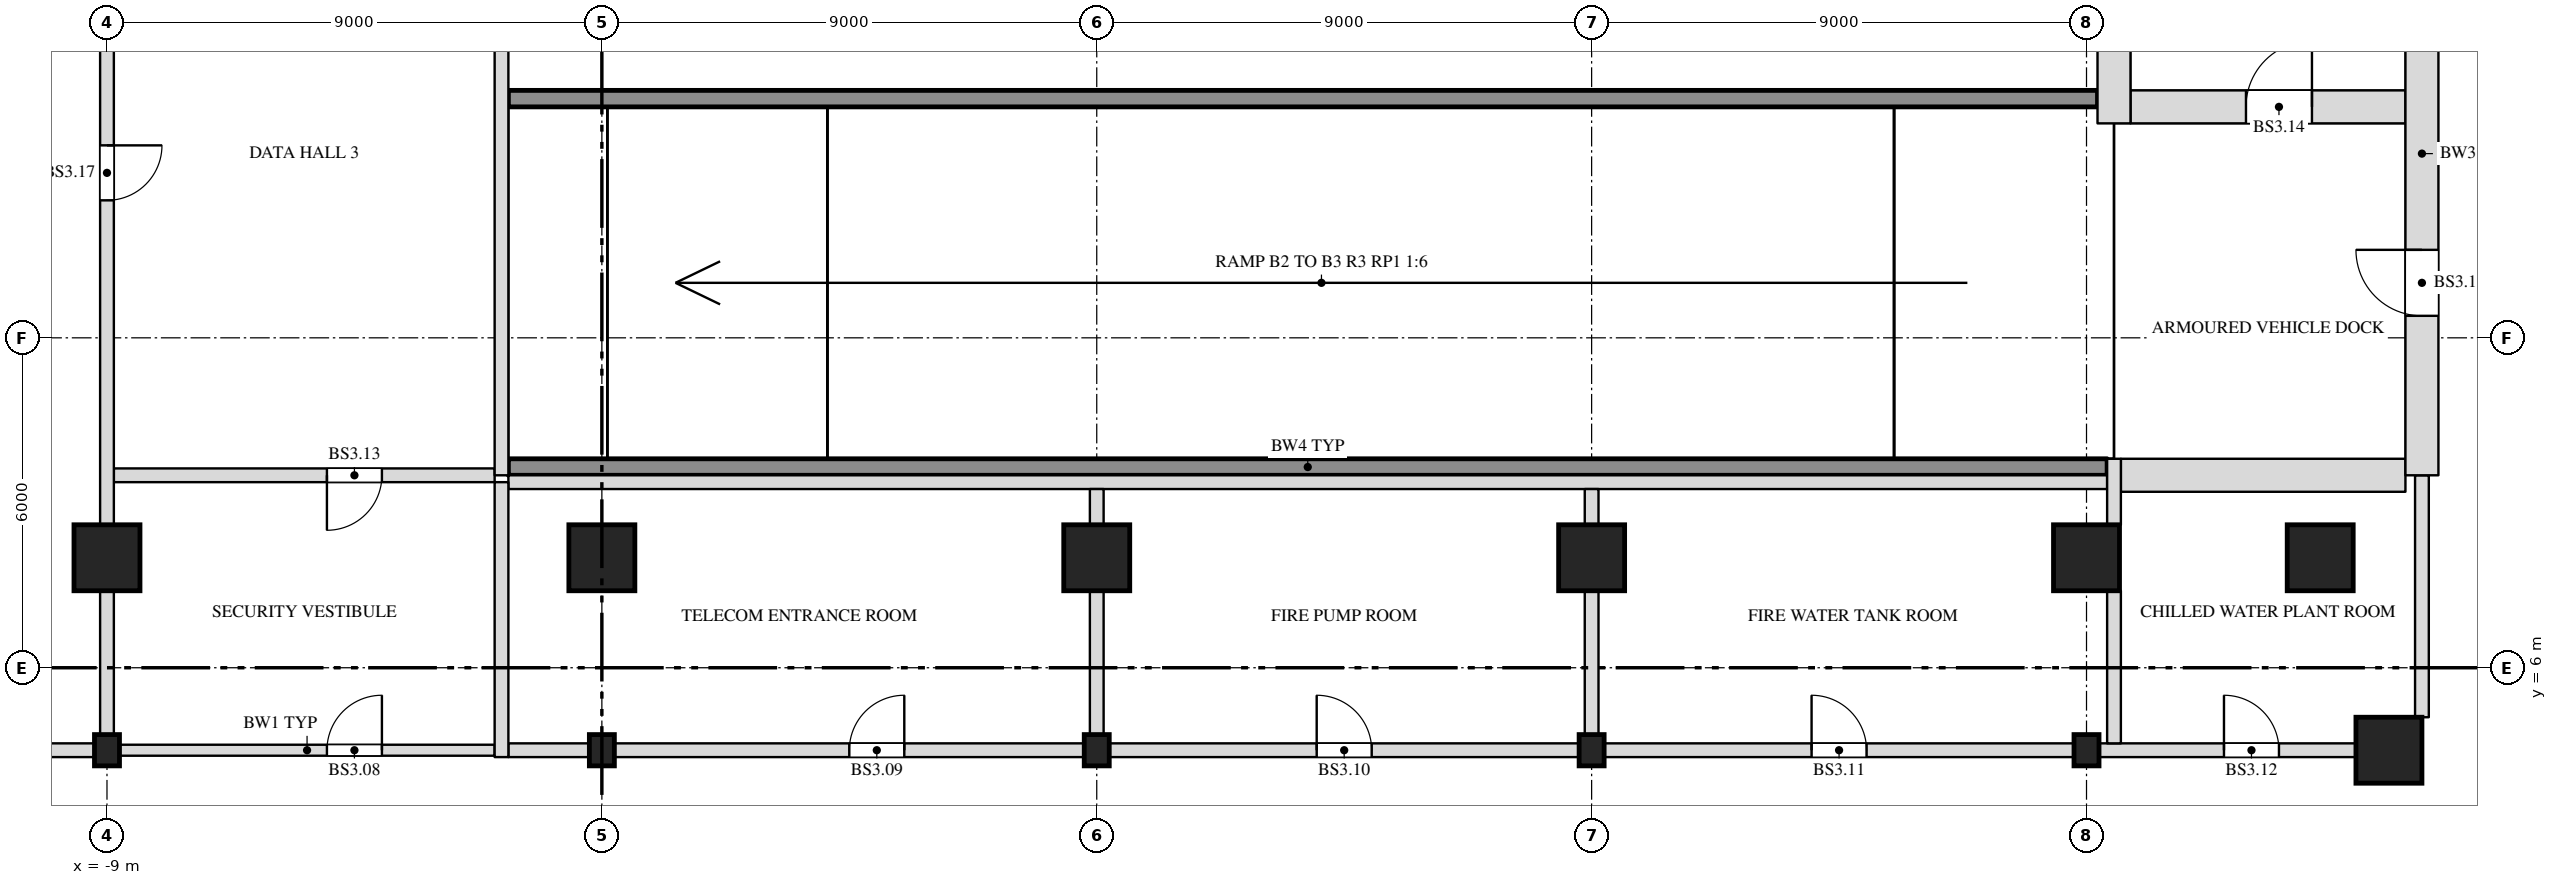
"""IFC4 building model, lengths in metres.
Left out: names, types, materials, properties, quantities, classifications, styles, units other than length and angle.
Written with IfcOpenShell. Run it as: python <this file> out.ifc"""

import sys

from ifc_helpers import new_model, si_unit, direction, frame, frame_2d, origin, origin_2d, place, context, subcontext, project, spatial, rectangle, i_section, extrude, element, fill, save


model = new_model("IFC4")
c1 = context("Model", 3, precision=1e-05, world=origin(), true_north=direction((0.0, 1.0)))
c2 = subcontext(c1, "Body", "Model", "MODEL_VIEW")
j1 = project(units=[si_unit("LENGTHUNIT", "METRE"), si_unit("PLANEANGLEUNIT", "RADIAN")], contexts=[c1])
p1 = place(None, origin())
s1 = spatial("IfcSite", under=j1, at=p1, CompositionType="ELEMENT")
p2 = place(p1, origin())
s2 = spatial("IfcBuilding", under=s1, at=p2, CompositionType="ELEMENT")
p3 = place(p2, frame((0.0, 0.0, -12.6)))
s3 = spatial("IfcBuildingStorey", under=s2, at=p3, CompositionType="ELEMENT", Elevation=-12.6)
for number, where, z_axis, x_axis in (
    (1, (-9.0, 4.5, 0.0), (0.0, 0.0, 1.0), (1.0, 0.0, 0.0)),
    (2, (0.0, 4.5, 0.0), (0.0, 0.0, 1.0), (1.0, 0.0, 0.0)),
    (3, (9.0, 4.5, 0.0), (0.0, 0.0, 1.0), (1.0, 0.0, 0.0)),
    (4, (18.0, 4.5, 0.0), (0.0, 0.0, 1.0), (1.0, 0.0, 0.0)),
    (5, (27.0, 4.5, 0.0), (0.0, 0.0, 1.0), (1.0, 0.0, 0.0)),
):
    element("IfcColumn", number, at=place(p3, frame(where, z_axis=z_axis, x_axis=x_axis)), inside=s3, PredefinedType="COLUMN", context=c2, shape_type="SweptSolid", body=[
        extrude(i_section(OverallWidth=0.455, OverallDepth=0.569, WebThickness=0.078, FlangeThickness=0.125, at=origin_2d()), origin(), (0.0, 0.0, 1.0), 4.2),
    ])
for number, where, z_axis, x_axis in (
    (6, (32.5, 4.5, 0.0), (0.0, 0.0, 1.0), (1.0, 0.0, 0.0)),
    (7, (-9.0, 8.0, 0.0), (0.0, 0.0, 1.0), (1.0, 0.0, 0.0)),
    (8, (0.0, 8.0, 0.0), (0.0, 0.0, 1.0), (1.0, 0.0, 0.0)),
    (9, (9.0, 8.0, 0.0), (0.0, 0.0, 1.0), (1.0, 0.0, 0.0)),
    (10, (18.0, 8.0, 0.0), (0.0, 0.0, 1.0), (1.0, 0.0, 0.0)),
    (11, (27.0, 8.0, 0.0), (0.0, 0.0, 1.0), (1.0, 0.0, 0.0)),
    (12, (31.25, 8.0, 0.0), (0.0, 0.0, 1.0), (1.0, 0.0, 0.0)),
):
    element("IfcColumn", number, at=place(p3, frame(where, z_axis=z_axis, x_axis=x_axis)), inside=s3, PredefinedType="COLUMN", context=c2, shape_type="SweptSolid", body=[
        extrude(rectangle(XDim=1.2, YDim=1.2, at=origin_2d()), origin(), (0.0, 0.0, 1.0), 4.2),
    ])
p4 = place(p3, frame((-17.773, 4.5, 0.0), z_axis=(0.0, 0.0, 1.0), x_axis=(1.0, 0.0, 0.0)))
e13 = element("IfcWall", 13, at=p4, inside=s3, PredefinedType="SOLIDWALL", context=c2, shape_type="SweptSolid", body=[
    extrude(rectangle(XDim=8.545, YDim=0.25, at=frame_2d((4.273, 0.0))), origin(), (0.0, 0.0, 1.0), 3.9),
])
p5 = place(p3, frame((-8.773, 4.5, 0.0), z_axis=(0.0, 0.0, 1.0), x_axis=(1.0, 0.0, 0.0)))
e14 = element("IfcWall", 14, at=p5, inside=s3, PredefinedType="PARTITIONING", context=c2, shape_type="SweptSolid", body=[
    extrude(rectangle(XDim=6.823, YDim=0.2, at=frame_2d((3.411, 0.0))), origin(), (0.0, 0.0, 1.0), 3.9),
])
p6 = place(p5, frame((3.773, 0.0, 0.0)))
e15 = element("IfcOpeningElement", 15, at=p6, cuts=e14, PredefinedType="OPENING", context=c2, shape_type="SweptSolid", body=[
    extrude(rectangle(XDim=1.0, YDim=2.1, at=frame_2d((0.5, 1.05))), frame((0.0, 0.112, 0.0), z_axis=(0.0, -1.0, 0.0), x_axis=(1.0, 0.0, 0.0)), (0.0, 0.0, 1.0), 0.224),
])
p7 = place(p3, frame((-1.7, 4.5, 0.0), z_axis=(0.0, 0.0, 1.0), x_axis=(1.0, 0.0, 0.0)))
e16 = element("IfcWall", 16, at=p7, inside=s3, PredefinedType="SOLIDWALL", context=c2, shape_type="SweptSolid", body=[
    extrude(rectangle(XDim=1.473, YDim=0.25, at=frame_2d((0.736, 0.0))), origin(), (0.0, 0.0, 1.0), 3.9),
])
p8 = place(p3, frame((0.227, 4.5, 0.0), z_axis=(0.0, 0.0, 1.0), x_axis=(1.0, 0.0, 0.0)))
e17 = element("IfcWall", 17, at=p8, inside=s3, PredefinedType="SOLIDWALL", context=c2, shape_type="SweptSolid", body=[
    extrude(rectangle(XDim=8.545, YDim=0.25, at=frame_2d((4.273, 0.0))), origin(), (0.0, 0.0, 1.0), 3.9),
])
p9 = place(p8, frame((4.273, 0.0, 0.0)))
e18 = element("IfcOpeningElement", 18, at=p9, cuts=e17, PredefinedType="OPENING", context=c2, shape_type="SweptSolid", body=[
    extrude(rectangle(XDim=1.0, YDim=2.1, at=frame_2d((0.5, 1.05))), frame((0.0, 0.137, 0.0), z_axis=(0.0, -1.0, 0.0), x_axis=(1.0, 0.0, 0.0)), (0.0, 0.0, 1.0), 0.274),
])
p10 = place(p3, frame((9.227, 4.5, 0.0), z_axis=(0.0, 0.0, 1.0), x_axis=(1.0, 0.0, 0.0)))
e19 = element("IfcWall", 19, at=p10, inside=s3, PredefinedType="SOLIDWALL", context=c2, shape_type="SweptSolid", body=[
    extrude(rectangle(XDim=8.545, YDim=0.25, at=frame_2d((4.273, 0.0))), origin(), (0.0, 0.0, 1.0), 3.9),
])
p11 = place(p10, frame((3.773, 0.0, 0.0)))
e20 = element("IfcOpeningElement", 20, at=p11, cuts=e19, PredefinedType="OPENING", context=c2, shape_type="SweptSolid", body=[
    extrude(rectangle(XDim=1.0, YDim=2.1, at=frame_2d((0.5, 1.05))), frame((0.0, 0.137, 0.0), z_axis=(0.0, -1.0, 0.0), x_axis=(1.0, 0.0, 0.0)), (0.0, 0.0, 1.0), 0.274),
])
p12 = place(p3, frame((18.227, 4.5, 0.0), z_axis=(0.0, 0.0, 1.0), x_axis=(1.0, 0.0, 0.0)))
e21 = element("IfcWall", 21, at=p12, inside=s3, PredefinedType="SOLIDWALL", context=c2, shape_type="SweptSolid", body=[
    extrude(rectangle(XDim=8.545, YDim=0.25, at=frame_2d((4.273, 0.0))), origin(), (0.0, 0.0, 1.0), 3.9),
])
p13 = place(p12, frame((3.773, 0.0, 0.0)))
e22 = element("IfcOpeningElement", 22, at=p13, cuts=e21, PredefinedType="OPENING", context=c2, shape_type="SweptSolid", body=[
    extrude(rectangle(XDim=1.0, YDim=2.1, at=frame_2d((0.5, 1.05))), frame((0.0, 0.137, 0.0), z_axis=(0.0, -1.0, 0.0), x_axis=(1.0, 0.0, 0.0)), (0.0, 0.0, 1.0), 0.274),
])
p14 = place(p3, frame((27.227, 4.5, 0.0), z_axis=(0.0, 0.0, 1.0), x_axis=(1.0, 0.0, 0.0)))
e23 = element("IfcWall", 23, at=p14, inside=s3, PredefinedType="SOLIDWALL", context=c2, shape_type="SweptSolid", body=[
    extrude(rectangle(XDim=4.673, YDim=0.25, at=frame_2d((2.336, 0.0))), origin(), (0.0, 0.0, 1.0), 3.9),
])
p15 = place(p14, frame((2.273, 0.0, 0.0)))
e24 = element("IfcOpeningElement", 24, at=p15, cuts=e23, PredefinedType="OPENING", context=c2, shape_type="SweptSolid", body=[
    extrude(rectangle(XDim=1.0, YDim=2.1, at=frame_2d((0.5, 1.05))), frame((0.0, 0.137, 0.0), z_axis=(0.0, -1.0, 0.0), x_axis=(1.0, 0.0, 0.0)), (0.0, 0.0, 1.0), 0.274),
])
p16 = place(p3, frame((-1.7, 9.375, 0.0), z_axis=(0.0, 0.0, 1.0), x_axis=(1.0, 0.0, 0.0)))
e25 = element("IfcWall", 25, at=p16, inside=s3, PredefinedType="SOLIDWALL", context=c2, shape_type="SweptSolid", body=[
    extrude(rectangle(XDim=29.075, YDim=0.25, at=frame_2d((14.538, 0.0))), origin(), (0.0, 0.0, 1.0), 3.9),
])
p17 = place(p3, frame((-8.875, 9.5, 0.0), z_axis=(0.0, 0.0, 1.0), x_axis=(1.0, 0.0, 0.0)))
e26 = element("IfcWall", 26, at=p17, inside=s3, PredefinedType="SOLIDWALL", context=c2, shape_type="SweptSolid", body=[
    extrude(rectangle(XDim=6.925, YDim=0.25, at=frame_2d((3.462, 0.0))), origin(), (0.0, 0.0, 1.0), 3.9),
])
p18 = place(p17, frame((3.875, 0.0, 0.0)))
e27 = element("IfcOpeningElement", 27, at=p18, cuts=e26, PredefinedType="OPENING", context=c2, shape_type="SweptSolid", body=[
    extrude(rectangle(XDim=1.0, YDim=2.1, at=frame_2d((0.5, 1.05))), frame((0.0, 0.137, 0.0), z_axis=(0.0, -1.0, 0.0), x_axis=(1.0, 0.0, 0.0)), (0.0, 0.0, 1.0), 0.274),
])
p19 = place(p3, frame((27.625, 9.5, 0.0), z_axis=(0.0, 0.0, 1.0), x_axis=(1.0, 0.0, 0.0)))
e28 = element("IfcWall", 28, at=p19, inside=s3, PredefinedType="SOLIDWALL", context=c2, shape_type="SweptSolid", body=[
    extrude(rectangle(XDim=5.175, YDim=0.6, at=frame_2d((2.587, 0.0))), origin(), (0.0, 0.0, 1.0), 3.9),
])
p20 = place(p3, frame((27.8, 16.2, 0.0), z_axis=(0.0, 0.0, 1.0), x_axis=(1.0, 0.0, 0.0)))
e29 = element("IfcWall", 29, at=p20, inside=s3, PredefinedType="SOLIDWALL", context=c2, shape_type="SweptSolid", body=[
    extrude(rectangle(XDim=5.0, YDim=0.6, at=frame_2d((2.5, 0.0))), origin(), (0.0, 0.0, 1.0), 3.9),
])
p21 = place(p20, frame((2.1, 0.0, 0.0)))
e30 = element("IfcOpeningElement", 30, at=p21, cuts=e29, PredefinedType="OPENING", context=c2, shape_type="SweptSolid", body=[
    extrude(rectangle(XDim=1.2, YDim=2.4, at=frame_2d((0.6, 1.2))), frame((0.0, 0.312, 0.0), z_axis=(0.0, -1.0, 0.0), x_axis=(1.0, 0.0, 0.0)), (0.0, 0.0, 1.0), 0.624),
])
p22 = place(p3, frame((-9.0, 4.784, 0.0), z_axis=(0.0, 0.0, 1.0), x_axis=(0.0, 1.0, 0.0)))
e31 = element("IfcWall", 31, at=p22, inside=s3, PredefinedType="SOLIDWALL", context=c2, shape_type="SweptSolid", body=[
    extrude(rectangle(XDim=2.615, YDim=0.25, at=frame_2d((1.308, 0.0))), origin(), (0.0, 0.0, 1.0), 3.9),
])
p23 = place(p3, frame((-9.0, 8.6, 0.0), z_axis=(0.0, 0.0, 1.0), x_axis=(0.0, 1.0, 0.0)))
e32 = element("IfcWall", 32, at=p23, inside=s3, PredefinedType="SOLIDWALL", context=c2, shape_type="SweptSolid", body=[
    extrude(rectangle(XDim=12.6, YDim=0.25, at=frame_2d((6.3, 0.0))), origin(), (0.0, 0.0, 1.0), 3.9),
])
p24 = place(p23, frame((5.9, 0.0, 0.0)))
e33 = element("IfcOpeningElement", 33, at=p24, cuts=e32, PredefinedType="OPENING", context=c2, shape_type="SweptSolid", body=[
    extrude(rectangle(XDim=1.0, YDim=2.1, at=frame_2d((0.5, 1.05))), frame((0.0, 0.137, 0.0), z_axis=(0.0, -1.0, 0.0), x_axis=(1.0, 0.0, 0.0)), (0.0, 0.0, 1.0), 0.274),
])
p25 = place(p3, frame((-1.825, 4.375, 0.0), z_axis=(0.0, 0.0, 1.0), x_axis=(0.0, 1.0, 0.0)))
e34 = element("IfcWall", 34, at=p25, inside=s3, PredefinedType="SOLIDWALL", context=c2, shape_type="SweptSolid", body=[
    extrude(rectangle(XDim=5.0, YDim=0.25, at=frame_2d((2.5, 0.0))), origin(), (0.0, 0.0, 1.0), 3.9),
])
p26 = place(p3, frame((-1.825, 9.5, 0.0), z_axis=(0.0, 0.0, 1.0), x_axis=(0.0, 1.0, 0.0)))
e35 = element("IfcWall", 35, at=p26, inside=s3, PredefinedType="SOLIDWALL", context=c2, shape_type="SweptSolid", body=[
    extrude(rectangle(XDim=11.7, YDim=0.25, at=frame_2d((5.85, 0.0))), origin(), (0.0, 0.0, 1.0), 3.9),
])
p27 = place(p3, frame((9.0, 4.784, 0.0), z_axis=(0.0, 0.0, 1.0), x_axis=(0.0, 1.0, 0.0)))
e36 = element("IfcWall", 36, at=p27, inside=s3, PredefinedType="SOLIDWALL", context=c2, shape_type="SweptSolid", body=[
    extrude(rectangle(XDim=2.615, YDim=0.25, at=frame_2d((1.308, 0.0))), origin(), (0.0, 0.0, 1.0), 3.9),
])
p28 = place(p3, frame((9.0, 8.6, 0.0), z_axis=(0.0, 0.0, 1.0), x_axis=(0.0, 1.0, 0.0)))
e37 = element("IfcWall", 37, at=p28, inside=s3, PredefinedType="SOLIDWALL", context=c2, shape_type="SweptSolid", body=[
    extrude(rectangle(XDim=0.65, YDim=0.25, at=frame_2d((0.325, 0.0))), origin(), (0.0, 0.0, 1.0), 3.9),
])
p29 = place(p3, frame((18.0, 4.784, 0.0), z_axis=(0.0, 0.0, 1.0), x_axis=(0.0, 1.0, 0.0)))
e38 = element("IfcWall", 38, at=p29, inside=s3, PredefinedType="SOLIDWALL", context=c2, shape_type="SweptSolid", body=[
    extrude(rectangle(XDim=2.615, YDim=0.25, at=frame_2d((1.308, 0.0))), origin(), (0.0, 0.0, 1.0), 3.9),
])
p30 = place(p3, frame((18.0, 8.6, 0.0), z_axis=(0.0, 0.0, 1.0), x_axis=(0.0, 1.0, 0.0)))
e39 = element("IfcWall", 39, at=p30, inside=s3, PredefinedType="SOLIDWALL", context=c2, shape_type="SweptSolid", body=[
    extrude(rectangle(XDim=0.65, YDim=0.25, at=frame_2d((0.325, 0.0))), origin(), (0.0, 0.0, 1.0), 3.9),
])
p31 = place(p3, frame((27.5, 4.625, 0.0), z_axis=(0.0, 0.0, 1.0), x_axis=(0.0, 1.0, 0.0)))
e40 = element("IfcWall", 40, at=p31, inside=s3, PredefinedType="SOLIDWALL", context=c2, shape_type="SweptSolid", body=[
    extrude(rectangle(XDim=2.775, YDim=0.25, at=frame_2d((1.387, 0.0))), origin(), (0.0, 0.0, 1.0), 3.9),
])
p32 = place(p3, frame((27.5, 8.6, 0.0), z_axis=(0.0, 0.0, 1.0), x_axis=(0.0, 1.0, 0.0)))
e41 = element("IfcWall", 41, at=p32, inside=s3, PredefinedType="SOLIDWALL", context=c2, shape_type="SweptSolid", body=[
    extrude(rectangle(XDim=1.2, YDim=0.25, at=frame_2d((0.6, 0.0))), origin(), (0.0, 0.0, 1.0), 3.9),
])
p33 = place(p3, frame((27.5, 15.9, 0.0), z_axis=(0.0, 0.0, 1.0), x_axis=(0.0, 1.0, 0.0)))
e42 = element("IfcWall", 42, at=p33, inside=s3, PredefinedType="SOLIDWALL", context=c2, shape_type="SweptSolid", body=[
    extrude(rectangle(XDim=1.5, YDim=0.6, at=frame_2d((0.75, 0.0))), origin(), (0.0, 0.0, 1.0), 3.9),
])
p34 = place(p3, frame((33.1, 5.1, 0.0), z_axis=(0.0, 0.0, 1.0), x_axis=(0.0, 1.0, 0.0)))
e43 = element("IfcWall", 43, at=p34, inside=s3, PredefinedType="SOLIDWALL", context=c2, shape_type="SweptSolid", body=[
    extrude(rectangle(XDim=4.4, YDim=0.25, at=frame_2d((2.2, 0.0))), origin(), (0.0, 0.0, 1.0), 3.9),
])
p35 = place(p3, frame((33.1, 9.5, 0.0), z_axis=(0.0, 0.0, 1.0), x_axis=(0.0, 1.0, 0.0)))
e44 = element("IfcWall", 44, at=p35, inside=s3, PredefinedType="SOLIDWALL", context=c2, shape_type="SweptSolid", body=[
    extrude(rectangle(XDim=11.7, YDim=0.6, at=frame_2d((5.85, 0.0))), origin(), (0.0, 0.0, 1.0), 3.9),
])
p36 = place(p35, frame((2.9, 0.0, 0.0)))
e45 = element("IfcOpeningElement", 45, at=p36, cuts=e44, PredefinedType="OPENING", context=c2, shape_type="SweptSolid", body=[
    extrude(rectangle(XDim=1.2, YDim=2.4, at=frame_2d((0.6, 1.2))), frame((0.0, 0.312, 0.0), z_axis=(0.0, -1.0, 0.0), x_axis=(1.0, 0.0, 0.0)), (0.0, 0.0, 1.0), 0.624),
])
p37 = place(p3, frame((-1.7, 9.65, 0.0), z_axis=(0.0, 0.0, 1.0), x_axis=(1.0, 0.0, 0.0)))
e46 = element("IfcWall", 46, at=p37, inside=s3, PredefinedType="SOLIDWALL", context=c2, shape_type="SweptSolid", body=[
    extrude(rectangle(XDim=29.075, YDim=0.3, at=frame_2d((14.538, 0.0))), origin(), (0.0, 0.0, 1.0), 4.2),
])
p38 = place(p3, frame((-1.7, 16.35, 0.0), z_axis=(0.0, 0.0, 1.0), x_axis=(1.0, 0.0, 0.0)))
e47 = element("IfcWall", 47, at=p38, inside=s3, PredefinedType="SOLIDWALL", context=c2, shape_type="SweptSolid", body=[
    extrude(rectangle(XDim=28.9, YDim=0.3, at=frame_2d((14.45, 0.0))), origin(), (0.0, 0.0, 1.0), 4.2),
])
p39 = place(p6, origin())
e48 = element("IfcDoor", 48, at=p39, inside=s3, OperationType="SINGLE_SWING_RIGHT", PredefinedType="DOOR", context=c2, shape_type="SweptSolid", body=[
    extrude(rectangle(XDim=1.0, YDim=2.1, at=frame_2d((0.5, 1.05))), frame((0.0, 0.025, 0.0), z_axis=(0.0, -1.0, 0.0), x_axis=(1.0, 0.0, 0.0)), (0.0, 0.0, 1.0), 0.05),
])
fill(e15, e48)
p40 = place(p9, origin())
e49 = element("IfcDoor", 49, at=p40, inside=s3, OperationType="SINGLE_SWING_RIGHT", PredefinedType="DOOR", context=c2, shape_type="SweptSolid", body=[
    extrude(rectangle(XDim=1.0, YDim=2.1, at=frame_2d((0.5, 1.05))), frame((0.0, 0.025, 0.0), z_axis=(0.0, -1.0, 0.0), x_axis=(1.0, 0.0, 0.0)), (0.0, 0.0, 1.0), 0.05),
])
fill(e18, e49)
p41 = place(p11, origin())
e50 = element("IfcDoor", 50, at=p41, inside=s3, OperationType="SINGLE_SWING_LEFT", PredefinedType="DOOR", context=c2, shape_type="SweptSolid", body=[
    extrude(rectangle(XDim=1.0, YDim=2.1, at=frame_2d((0.5, 1.05))), frame((0.0, 0.025, 0.0), z_axis=(0.0, -1.0, 0.0), x_axis=(1.0, 0.0, 0.0)), (0.0, 0.0, 1.0), 0.05),
])
fill(e20, e50)
p42 = place(p13, origin())
e51 = element("IfcDoor", 51, at=p42, inside=s3, OperationType="SINGLE_SWING_LEFT", PredefinedType="DOOR", context=c2, shape_type="SweptSolid", body=[
    extrude(rectangle(XDim=1.0, YDim=2.1, at=frame_2d((0.5, 1.05))), frame((0.0, 0.025, 0.0), z_axis=(0.0, -1.0, 0.0), x_axis=(1.0, 0.0, 0.0)), (0.0, 0.0, 1.0), 0.05),
])
fill(e22, e51)
p43 = place(p15, origin())
e52 = element("IfcDoor", 52, at=p43, inside=s3, OperationType="SINGLE_SWING_LEFT", PredefinedType="DOOR", context=c2, shape_type="SweptSolid", body=[
    extrude(rectangle(XDim=1.0, YDim=2.1, at=frame_2d((0.5, 1.05))), frame((0.0, 0.025, 0.0), z_axis=(0.0, -1.0, 0.0), x_axis=(1.0, 0.0, 0.0)), (0.0, 0.0, 1.0), 0.05),
])
fill(e24, e52)
p44 = place(p18, origin())
e53 = element("IfcDoor", 53, at=p44, inside=s3, OperationType="SINGLE_SWING_RIGHT", PredefinedType="DOOR", context=c2, shape_type="SweptSolid", body=[
    extrude(rectangle(XDim=1.0, YDim=2.1, at=frame_2d((0.5, 1.05))), frame((0.0, 0.025, 0.0), z_axis=(0.0, -1.0, 0.0), x_axis=(1.0, 0.0, 0.0)), (0.0, 0.0, 1.0), 0.05),
])
fill(e27, e53)
p45 = place(p21, origin())
e54 = element("IfcDoor", 54, at=p45, inside=s3, OperationType="SINGLE_SWING_RIGHT", PredefinedType="DOOR", context=c2, shape_type="SweptSolid", body=[
    extrude(rectangle(XDim=1.2, YDim=2.4, at=frame_2d((0.6, 1.2))), frame((0.0, 0.025, 0.0), z_axis=(0.0, -1.0, 0.0), x_axis=(1.0, 0.0, 0.0)), (0.0, 0.0, 1.0), 0.05),
])
fill(e30, e54)
p46 = place(p24, origin())
e55 = element("IfcDoor", 55, at=p46, inside=s3, OperationType="SINGLE_SWING_LEFT", PredefinedType="DOOR", context=c2, shape_type="SweptSolid", body=[
    extrude(rectangle(XDim=1.0, YDim=2.1, at=frame_2d((0.5, 1.05))), frame((0.0, 0.025, 0.0), z_axis=(0.0, -1.0, 0.0), x_axis=(1.0, 0.0, 0.0)), (0.0, 0.0, 1.0), 0.05),
])
fill(e33, e55)
p47 = place(p36, origin())
e56 = element("IfcDoor", 56, at=p47, inside=s3, OperationType="SINGLE_SWING_RIGHT", PredefinedType="DOOR", context=c2, shape_type="SweptSolid", body=[
    extrude(rectangle(XDim=1.2, YDim=2.4, at=frame_2d((0.6, 1.2))), frame((0.0, 0.025, 0.0), z_axis=(0.0, -1.0, 0.0), x_axis=(1.0, 0.0, 0.0)), (0.0, 0.0, 1.0), 0.05),
])
fill(e45, e56)
save(model, sys.argv[1])
